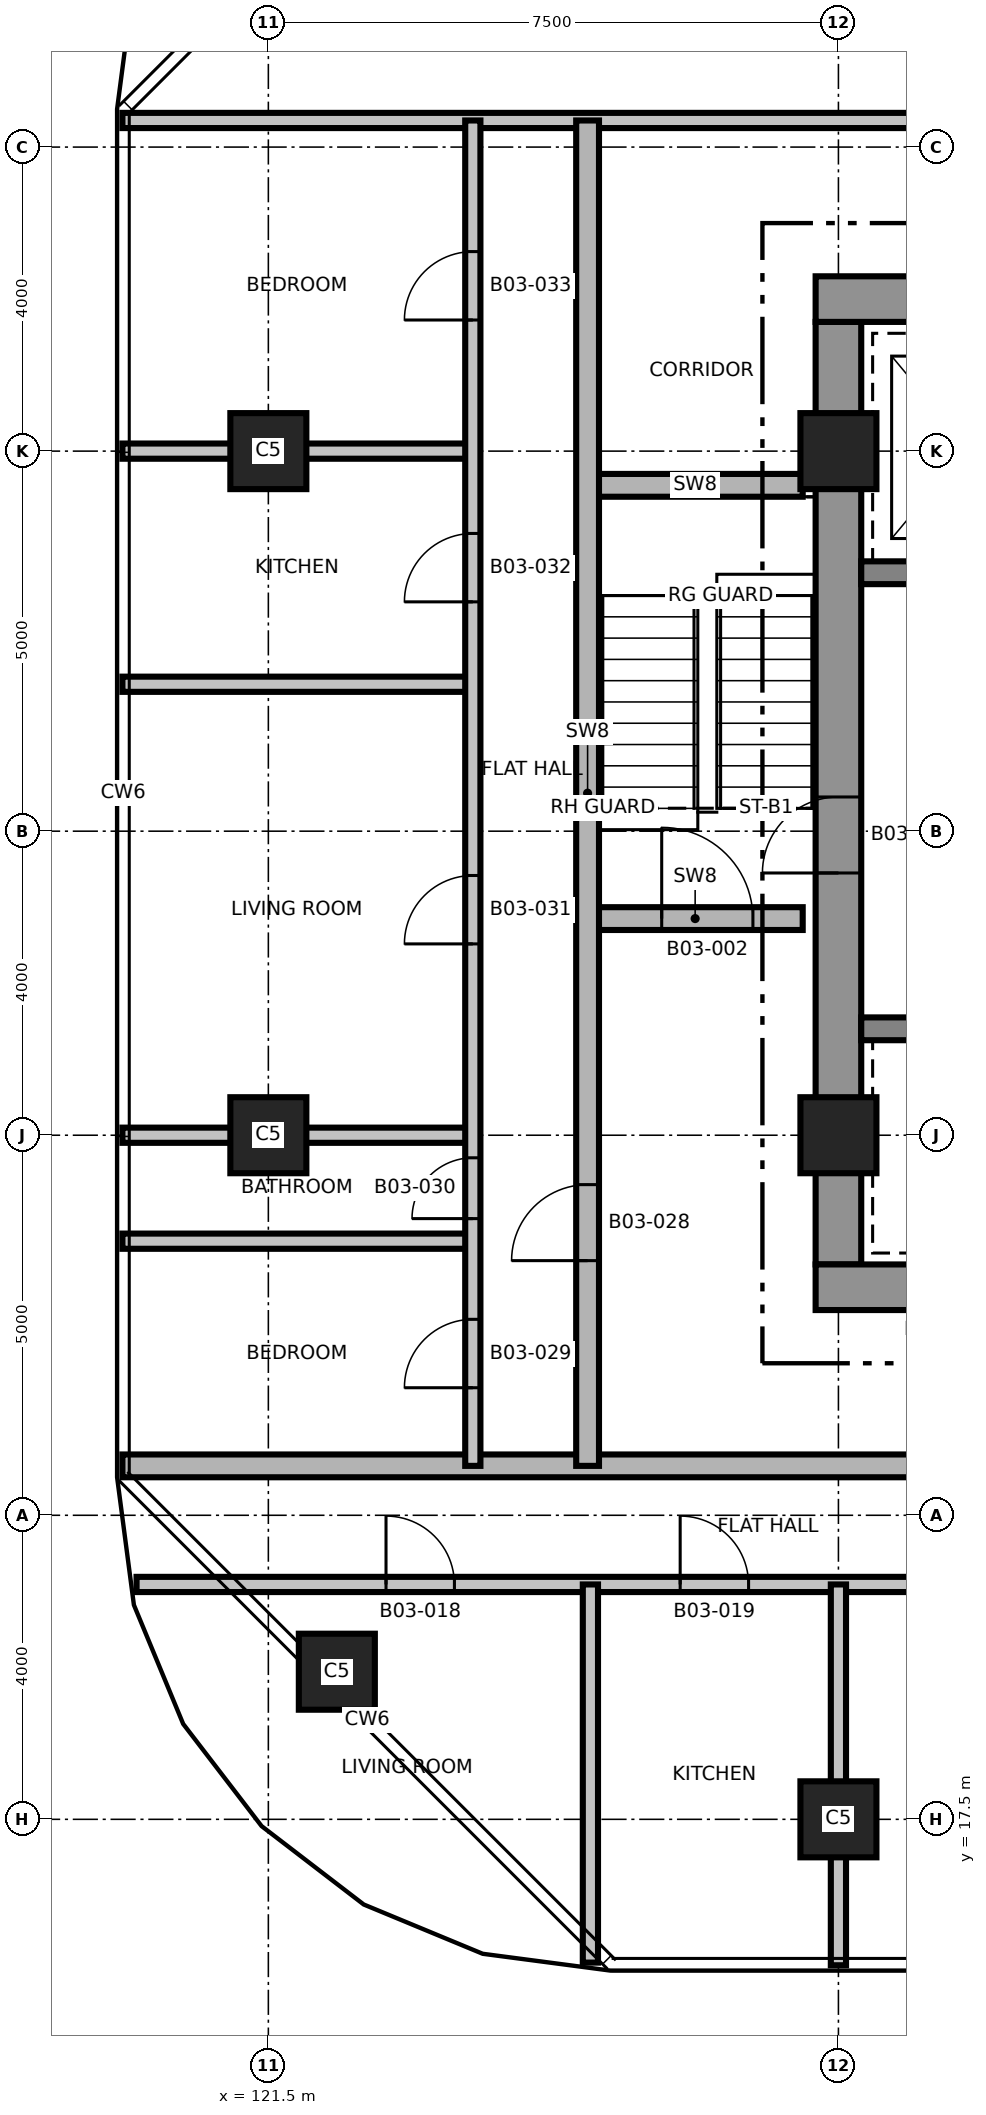
"""IFC4 building model, lengths in metres.
Left out: names, types, materials, properties, quantities, classifications, styles, units other than length and angle.
Written with IfcOpenShell. Run it as: python <this file> out.ifc"""

import sys

from ifc_helpers import new_model, si_unit, direction, frame, frame_2d, origin, origin_2d, place, context, subcontext, project, spatial, rectangle, extrude, element, fill, save


model = new_model("IFC4")
c1 = context("Model", 3, precision=1e-05, world=origin(), true_north=direction((0.0, 1.0)))
c2 = subcontext(c1, "Body", "Model", "MODEL_VIEW")
j1 = project(units=[si_unit("LENGTHUNIT", "METRE"), si_unit("PLANEANGLEUNIT", "RADIAN")], contexts=[c1])
p1 = place(None, origin())
s1 = spatial("IfcSite", under=j1, at=p1, CompositionType="ELEMENT")
p2 = place(p1, origin())
s2 = spatial("IfcBuilding", under=s1, at=p2, CompositionType="ELEMENT")
p3 = place(p2, frame((0.0, 0.0, 55.7)))
s3 = spatial("IfcBuildingStorey", under=s2, at=p3, CompositionType="ELEMENT", Elevation=55.7)
p4 = place(p3, frame((129.0, 24.8, 0.0), z_axis=(0.0, 0.0, 1.0), x_axis=(0.0, 1.0, 0.0)))
e1 = element("IfcWall", 1, at=p4, inside=s3, PredefinedType="SHEAR", context=c2, shape_type="SweptSolid", body=[
    extrude(rectangle(XDim=12.4, YDim=0.6, at=frame_2d((6.2, 0.0))), origin(), (0.0, 0.0, 1.0), 3.7),
])
p5 = place(p4, frame((5.15, 0.0, 0.0)))
e2 = element("IfcOpeningElement", 2, at=p5, cuts=e1, PredefinedType="OPENING", context=c2, shape_type="SweptSolid", body=[
    extrude(rectangle(XDim=1.0, YDim=2.1, at=frame_2d((0.5, 1.05))), frame((0.0, 0.31, 0.0), z_axis=(0.0, -1.0, 0.0), x_axis=(1.0, 0.0, 0.0)), (0.0, 0.0, 1.0), 0.62),
])
p6 = place(p3, frame((128.7, 24.5, 0.0), z_axis=(0.0, 0.0, 1.0), x_axis=(1.0, 0.0, 0.0)))
e3 = element("IfcWall", 3, at=p6, inside=s3, PredefinedType="SHEAR", context=c2, shape_type="SweptSolid", body=[
    extrude(rectangle(XDim=15.0, YDim=0.6, at=frame_2d((7.5, 0.0))), origin(), (0.0, 0.0, 1.0), 3.7),
])
p7 = place(p6, frame((9.65, 0.0, 0.0)))
e4 = element("IfcOpeningElement", 4, at=p7, cuts=e3, PredefinedType="OPENING", context=c2, shape_type="SweptSolid", body=[
    extrude(rectangle(XDim=1.5, YDim=2.1, at=frame_2d((0.75, 1.05))), frame((0.0, 0.31, 0.0), z_axis=(0.0, -1.0, 0.0), x_axis=(1.0, 0.0, 0.0)), (0.0, 0.0, 1.0), 0.62),
])
p8 = place(p6, frame((1.25, 0.0, 0.0)))
e5 = element("IfcOpeningElement", 5, at=p8, cuts=e3, PredefinedType="OPENING", context=c2, shape_type="SweptSolid", body=[
    extrude(rectangle(XDim=0.9, YDim=2.1, at=frame_2d((0.45, 1.05))), frame((0.0, 0.31, 0.0), z_axis=(0.0, -1.0, 0.0), x_axis=(1.0, 0.0, 0.0)), (0.0, 0.0, 1.0), 0.62),
])
p9 = place(p3, frame((128.7, 37.5, 0.0), z_axis=(0.0, 0.0, 1.0), x_axis=(1.0, 0.0, 0.0)))
e6 = element("IfcWall", 6, at=p9, inside=s3, PredefinedType="SHEAR", context=c2, shape_type="SweptSolid", body=[
    extrude(rectangle(XDim=15.0, YDim=0.6, at=frame_2d((7.5, 0.0))), origin(), (0.0, 0.0, 1.0), 3.7),
])
p10 = place(p9, frame((9.65, 0.0, 0.0)))
e7 = element("IfcOpeningElement", 7, at=p10, cuts=e6, PredefinedType="OPENING", context=c2, shape_type="SweptSolid", body=[
    extrude(rectangle(XDim=1.5, YDim=2.1, at=frame_2d((0.75, 1.05))), frame((0.0, 0.31, 0.0), z_axis=(0.0, -1.0, 0.0), x_axis=(1.0, 0.0, 0.0)), (0.0, 0.0, 1.0), 0.62),
])
p11 = place(p9, frame((12.85, 0.0, 0.0)))
e8 = element("IfcOpeningElement", 8, at=p11, cuts=e6, PredefinedType="OPENING", context=c2, shape_type="SweptSolid", body=[
    extrude(rectangle(XDim=0.9, YDim=2.1, at=frame_2d((0.45, 1.05))), frame((0.0, 0.31, 0.0), z_axis=(0.0, -1.0, 0.0), x_axis=(1.0, 0.0, 0.0)), (0.0, 0.0, 1.0), 0.62),
])
p12 = place(p9, frame((3.8, 0.0, 0.0)))
e9 = element("IfcOpeningElement", 9, at=p12, cuts=e6, PredefinedType="OPENING", context=c2, shape_type="SweptSolid", body=[
    extrude(rectangle(XDim=0.9, YDim=2.1, at=frame_2d((0.45, 1.05))), frame((0.0, 0.31, 0.0), z_axis=(0.0, -1.0, 0.0), x_axis=(1.0, 0.0, 0.0)), (0.0, 0.0, 1.0), 0.62),
])
p13 = place(p9, frame((6.7, 0.0, 0.0)))
e10 = element("IfcOpeningElement", 10, at=p13, cuts=e6, PredefinedType="OPENING", context=c2, shape_type="SweptSolid", body=[
    extrude(rectangle(XDim=0.9, YDim=2.1, at=frame_2d((0.45, 1.05))), frame((0.0, 0.31, 0.0), z_axis=(0.0, -1.0, 0.0), x_axis=(1.0, 0.0, 0.0)), (0.0, 0.0, 1.0), 0.62),
])
p14 = place(p3, frame((129.3, 27.9, 0.0), z_axis=(0.0, 0.0, 1.0), x_axis=(1.0, 0.0, 0.0)))
e11 = element("IfcWall", 11, at=p14, inside=s3, PredefinedType="SHEAR", context=c2, shape_type="SweptSolid", body=[
    extrude(rectangle(XDim=2.65, YDim=0.3, at=frame_2d((1.325, 0.0))), origin(), (0.0, 0.0, 1.0), 3.7),
])
p15 = place(p3, frame((129.3, 33.9, 0.0), z_axis=(0.0, 0.0, 1.0), x_axis=(1.0, 0.0, 0.0)))
e12 = element("IfcWall", 12, at=p15, inside=s3, PredefinedType="SHEAR", context=c2, shape_type="SweptSolid", body=[
    extrude(rectangle(XDim=2.65, YDim=0.3, at=frame_2d((1.325, 0.0))), origin(), (0.0, 0.0, 1.0), 3.7),
])
p16 = place(p15, frame((1.05, 0.0, 0.0)))
e13 = element("IfcOpeningElement", 13, at=p16, cuts=e12, PredefinedType="OPENING", context=c2, shape_type="SweptSolid", body=[
    extrude(rectangle(XDim=1.3, YDim=2.4, at=frame_2d((0.65, 1.2))), frame((0.0, 0.16, 0.0), z_axis=(0.0, -1.0, 0.0), x_axis=(1.0, 0.0, 0.0)), (0.0, 0.0, 1.0), 0.32),
])
for number, where, z_axis, x_axis in (
    (14, (129.0, 17.5, 0.0), (0.0, 0.0, 1.0), (1.0, 0.0, 0.0)),
    (15, (122.401, 19.442, 0.0), (0.0, 0.0, 1.0), (1.0, 0.0, 0.0)),
    (16, (121.5, 26.5, 0.0), (0.0, 0.0, 1.0), (1.0, 0.0, 0.0)),
    (17, (129.0, 26.5, 0.0), (0.0, 0.0, 1.0), (1.0, 0.0, 0.0)),
    (18, (121.5, 35.5, 0.0), (0.0, 0.0, 1.0), (1.0, 0.0, 0.0)),
    (19, (129.0, 35.5, 0.0), (0.0, 0.0, 1.0), (1.0, 0.0, 0.0)),
):
    element("IfcColumn", number, at=place(p3, frame(where, z_axis=z_axis, x_axis=x_axis)), inside=s3, PredefinedType="COLUMN", context=c2, shape_type="SweptSolid", body=[
        extrude(rectangle(XDim=1.0, YDim=1.0, at=origin_2d()), origin(), (0.0, 0.0, 1.0), 3.7),
    ])
p17 = place(p3, frame((119.766, 20.59, 0.0), z_axis=(0.0, 0.0, 1.0), x_axis=(1.0, 0.0, 0.0)))
e20 = element("IfcWall", 20, at=p17, inside=s3, PredefinedType="PARTITIONING", context=c2, shape_type="SweptSolid", body=[
    extrude(rectangle(XDim=16.734, YDim=0.2, at=frame_2d((8.367, 0.0))), origin(), (0.0, 0.0, 1.0), 3.4),
])
p18 = place(p17, frame((3.282, 0.0, 0.0)))
e21 = element("IfcOpeningElement", 21, at=p18, cuts=e20, PredefinedType="OPENING", context=c2, shape_type="SweptSolid", body=[
    extrude(rectangle(XDim=0.9, YDim=2.1, at=frame_2d((0.45, 1.05))), frame((0.0, 0.11, 0.0), z_axis=(0.0, -1.0, 0.0), x_axis=(1.0, 0.0, 0.0)), (0.0, 0.0, 1.0), 0.22),
])
p19 = place(p17, frame((7.152, 0.0, 0.0)))
e22 = element("IfcOpeningElement", 22, at=p19, cuts=e20, PredefinedType="OPENING", context=c2, shape_type="SweptSolid", body=[
    extrude(rectangle(XDim=0.9, YDim=2.1, at=frame_2d((0.45, 1.05))), frame((0.0, 0.11, 0.0), z_axis=(0.0, -1.0, 0.0), x_axis=(1.0, 0.0, 0.0)), (0.0, 0.0, 1.0), 0.22),
])
p20 = place(p17, frame((11.318, 0.0, 0.0)))
e23 = element("IfcOpeningElement", 23, at=p20, cuts=e20, PredefinedType="OPENING", context=c2, shape_type="SweptSolid", body=[
    extrude(rectangle(XDim=0.9, YDim=2.1, at=frame_2d((0.45, 1.05))), frame((0.0, 0.11, 0.0), z_axis=(0.0, -1.0, 0.0), x_axis=(1.0, 0.0, 0.0)), (0.0, 0.0, 1.0), 0.22),
])
p21 = place(p17, frame((15.118, 0.0, 0.0)))
e24 = element("IfcOpeningElement", 24, at=p21, cuts=e20, PredefinedType="OPENING", context=c2, shape_type="SweptSolid", body=[
    extrude(rectangle(XDim=0.8, YDim=2.1, at=frame_2d((0.4, 1.05))), frame((0.0, 0.11, 0.0), z_axis=(0.0, -1.0, 0.0), x_axis=(1.0, 0.0, 0.0)), (0.0, 0.0, 1.0), 0.22),
])
p22 = place(p3, frame((119.58, 22.15, 0.0), z_axis=(0.0, 0.0, 1.0), x_axis=(1.0, 0.0, 0.0)))
e25 = element("IfcWall", 25, at=p22, inside=s3, PredefinedType="SHEAR", context=c2, shape_type="SweptSolid", body=[
    extrude(rectangle(XDim=33.84, YDim=0.3, at=frame_2d((16.92, 0.0))), origin(), (0.0, 0.0, 1.0), 3.4),
])
p23 = place(p22, frame((23.17, 0.0, 0.0)))
e26 = element("IfcOpeningElement", 26, at=p23, cuts=e25, PredefinedType="OPENING", context=c2, shape_type="SweptSolid", body=[
    extrude(rectangle(XDim=1.0, YDim=2.1, at=frame_2d((0.5, 1.05))), frame((0.0, 0.16, 0.0), z_axis=(0.0, -1.0, 0.0), x_axis=(1.0, 0.0, 0.0)), (0.0, 0.0, 1.0), 0.32),
])
p24 = place(p22, frame((11.52, 0.0, 0.0)))
e27 = element("IfcOpeningElement", 27, at=p24, cuts=e25, PredefinedType="OPENING", context=c2, shape_type="SweptSolid", body=[
    extrude(rectangle(XDim=1.0, YDim=2.1, at=frame_2d((0.5, 1.05))), frame((0.0, 0.16, 0.0), z_axis=(0.0, -1.0, 0.0), x_axis=(1.0, 0.0, 0.0)), (0.0, 0.0, 1.0), 0.32),
])
p25 = place(p22, frame((25.07, 0.0, 0.0)))
e28 = element("IfcOpeningElement", 28, at=p25, cuts=e25, PredefinedType="OPENING", context=c2, shape_type="SweptSolid", body=[
    extrude(rectangle(XDim=1.0, YDim=2.1, at=frame_2d((0.5, 1.05))), frame((0.0, 0.16, 0.0), z_axis=(0.0, -1.0, 0.0), x_axis=(1.0, 0.0, 0.0)), (0.0, 0.0, 1.0), 0.32),
])
p26 = place(p22, frame((17.17, 0.0, 0.0)))
e29 = element("IfcOpeningElement", 29, at=p26, cuts=e25, PredefinedType="OPENING", context=c2, shape_type="SweptSolid", body=[
    extrude(rectangle(XDim=0.9, YDim=2.1, at=frame_2d((0.45, 1.05))), frame((0.0, 0.16, 0.0), z_axis=(0.0, -1.0, 0.0), x_axis=(1.0, 0.0, 0.0)), (0.0, 0.0, 1.0), 0.32),
])
for number, where, z_axis, x_axis in (
    (30, (119.58, 25.106, 0.0), (0.0, 0.0, 1.0), (1.0, 0.0, 0.0)),
    (31, (119.58, 26.5, 0.0), (0.0, 0.0, 1.0), (1.0, 0.0, 0.0)),
):
    element("IfcWall", number, at=place(p3, frame(where, z_axis=z_axis, x_axis=x_axis)), inside=s3, PredefinedType="PARTITIONING", context=c2, shape_type="SweptSolid", body=[
        extrude(rectangle(XDim=4.61, YDim=0.2, at=frame_2d((2.305, 0.0))), origin(), (0.0, 0.0, 1.0), 3.4),
    ])
p27 = place(p3, frame((125.7, 29.35, 0.0), z_axis=(0.0, 0.0, 1.0), x_axis=(1.0, 0.0, 0.0)))
e32 = element("IfcWall", 32, at=p27, inside=s3, PredefinedType="SHEAR", context=c2, shape_type="SweptSolid", body=[
    extrude(rectangle(XDim=2.83, YDim=0.3, at=frame_2d((1.415, 0.0))), origin(), (0.0, 0.0, 1.0), 3.4),
])
p28 = place(p27, frame((0.975, 0.0, 0.0)))
e33 = element("IfcOpeningElement", 33, at=p28, cuts=e32, PredefinedType="OPENING", context=c2, shape_type="SweptSolid", body=[
    extrude(rectangle(XDim=1.2, YDim=2.1, at=frame_2d((0.6, 1.05))), frame((0.0, 0.16, 0.0), z_axis=(0.0, -1.0, 0.0), x_axis=(1.0, 0.0, 0.0)), (0.0, 0.0, 1.0), 0.32),
])
p29 = place(p3, frame((119.58, 32.433, 0.0), z_axis=(0.0, 0.0, 1.0), x_axis=(1.0, 0.0, 0.0)))
e34 = element("IfcWall", 34, at=p29, inside=s3, PredefinedType="PARTITIONING", context=c2, shape_type="SweptSolid", body=[
    extrude(rectangle(XDim=4.61, YDim=0.2, at=frame_2d((2.305, 0.0))), origin(), (0.0, 0.0, 1.0), 3.4),
])
p30 = place(p3, frame((125.7, 35.05, 0.0), z_axis=(0.0, 0.0, 1.0), x_axis=(1.0, 0.0, 0.0)))
e35 = element("IfcWall", 35, at=p30, inside=s3, PredefinedType="SHEAR", context=c2, shape_type="SweptSolid", body=[
    extrude(rectangle(XDim=2.83, YDim=0.3, at=frame_2d((1.415, 0.0))), origin(), (0.0, 0.0, 1.0), 3.4),
])
p31 = place(p3, frame((119.58, 35.5, 0.0), z_axis=(0.0, 0.0, 1.0), x_axis=(1.0, 0.0, 0.0)))
e36 = element("IfcWall", 36, at=p31, inside=s3, PredefinedType="PARTITIONING", context=c2, shape_type="SweptSolid", body=[
    extrude(rectangle(XDim=4.61, YDim=0.2, at=frame_2d((2.305, 0.0))), origin(), (0.0, 0.0, 1.0), 3.4),
])
p32 = place(p3, frame((119.58, 39.85, 0.0), z_axis=(0.0, 0.0, 1.0), x_axis=(1.0, 0.0, 0.0)))
e37 = element("IfcWall", 37, at=p32, inside=s3, PredefinedType="PARTITIONING", context=c2, shape_type="SweptSolid", body=[
    extrude(rectangle(XDim=33.84, YDim=0.2, at=frame_2d((16.92, 0.0))), origin(), (0.0, 0.0, 1.0), 3.4),
])
p33 = place(p32, frame((15.27, 0.0, 0.0)))
e38 = element("IfcOpeningElement", 38, at=p33, cuts=e37, PredefinedType="OPENING", context=c2, shape_type="SweptSolid", body=[
    extrude(rectangle(XDim=1.0, YDim=2.1, at=frame_2d((0.5, 1.05))), frame((0.0, 0.11, 0.0), z_axis=(0.0, -1.0, 0.0), x_axis=(1.0, 0.0, 0.0)), (0.0, 0.0, 1.0), 0.22),
])
p34 = place(p32, frame((25.07, 0.0, 0.0)))
e39 = element("IfcOpeningElement", 39, at=p34, cuts=e37, PredefinedType="OPENING", context=c2, shape_type="SweptSolid", body=[
    extrude(rectangle(XDim=1.0, YDim=2.1, at=frame_2d((0.5, 1.05))), frame((0.0, 0.11, 0.0), z_axis=(0.0, -1.0, 0.0), x_axis=(1.0, 0.0, 0.0)), (0.0, 0.0, 1.0), 0.22),
])
p35 = place(p3, frame((124.19, 22.15, 0.0), z_axis=(0.0, 0.0, 1.0), x_axis=(0.0, 1.0, 0.0)))
e40 = element("IfcWall", 40, at=p35, inside=s3, PredefinedType="PARTITIONING", context=c2, shape_type="SweptSolid", body=[
    extrude(rectangle(XDim=17.7, YDim=0.2, at=frame_2d((8.85, 0.0))), origin(), (0.0, 0.0, 1.0), 3.4),
])
p36 = place(p35, frame((1.028, 0.0, 0.0)))
e41 = element("IfcOpeningElement", 41, at=p36, cuts=e40, PredefinedType="OPENING", context=c2, shape_type="SweptSolid", body=[
    extrude(rectangle(XDim=0.9, YDim=2.1, at=frame_2d((0.45, 1.05))), frame((0.0, 0.11, 0.0), z_axis=(0.0, -1.0, 0.0), x_axis=(1.0, 0.0, 0.0)), (0.0, 0.0, 1.0), 0.22),
])
p37 = place(p35, frame((3.253, 0.0, 0.0)))
e42 = element("IfcOpeningElement", 42, at=p37, cuts=e40, PredefinedType="OPENING", context=c2, shape_type="SweptSolid", body=[
    extrude(rectangle(XDim=0.8, YDim=2.1, at=frame_2d((0.4, 1.05))), frame((0.0, 0.11, 0.0), z_axis=(0.0, -1.0, 0.0), x_axis=(1.0, 0.0, 0.0)), (0.0, 0.0, 1.0), 0.22),
])
p38 = place(p35, frame((6.867, 0.0, 0.0)))
e43 = element("IfcOpeningElement", 43, at=p38, cuts=e40, PredefinedType="OPENING", context=c2, shape_type="SweptSolid", body=[
    extrude(rectangle(XDim=0.9, YDim=2.1, at=frame_2d((0.45, 1.05))), frame((0.0, 0.11, 0.0), z_axis=(0.0, -1.0, 0.0), x_axis=(1.0, 0.0, 0.0)), (0.0, 0.0, 1.0), 0.22),
])
p39 = place(p35, frame((11.367, 0.0, 0.0)))
e44 = element("IfcOpeningElement", 44, at=p39, cuts=e40, PredefinedType="OPENING", context=c2, shape_type="SweptSolid", body=[
    extrude(rectangle(XDim=0.9, YDim=2.1, at=frame_2d((0.45, 1.05))), frame((0.0, 0.11, 0.0), z_axis=(0.0, -1.0, 0.0), x_axis=(1.0, 0.0, 0.0)), (0.0, 0.0, 1.0), 0.22),
])
p40 = place(p35, frame((15.075, 0.0, 0.0)))
e45 = element("IfcOpeningElement", 45, at=p40, cuts=e40, PredefinedType="OPENING", context=c2, shape_type="SweptSolid", body=[
    extrude(rectangle(XDim=0.9, YDim=2.1, at=frame_2d((0.45, 1.05))), frame((0.0, 0.11, 0.0), z_axis=(0.0, -1.0, 0.0), x_axis=(1.0, 0.0, 0.0)), (0.0, 0.0, 1.0), 0.22),
])
p41 = place(p3, frame((125.7, 22.15, 0.0), z_axis=(0.0, 0.0, 1.0), x_axis=(0.0, 1.0, 0.0)))
e46 = element("IfcWall", 46, at=p41, inside=s3, PredefinedType="SHEAR", context=c2, shape_type="SweptSolid", body=[
    extrude(rectangle(XDim=17.7, YDim=0.3, at=frame_2d((8.85, 0.0))), origin(), (0.0, 0.0, 1.0), 3.4),
])
p42 = place(p41, frame((2.7, 0.0, 0.0)))
e47 = element("IfcOpeningElement", 47, at=p42, cuts=e46, PredefinedType="OPENING", context=c2, shape_type="SweptSolid", body=[
    extrude(rectangle(XDim=1.0, YDim=2.1, at=frame_2d((0.5, 1.05))), frame((0.0, 0.16, 0.0), z_axis=(0.0, -1.0, 0.0), x_axis=(1.0, 0.0, 0.0)), (0.0, 0.0, 1.0), 0.32),
])
p43 = place(p3, frame((125.737, 15.615, 0.0), z_axis=(0.0, 0.0, 1.0), x_axis=(0.0, 1.0, 0.0)))
e48 = element("IfcWall", 48, at=p43, inside=s3, PredefinedType="PARTITIONING", context=c2, shape_type="SweptSolid", body=[
    extrude(rectangle(XDim=4.975, YDim=0.2, at=frame_2d((2.488, 0.0))), origin(), (0.0, 0.0, 1.0), 3.4),
])
p44 = place(p3, frame((129.0, 15.58, 0.0), z_axis=(0.0, 0.0, 1.0), x_axis=(0.0, 1.0, 0.0)))
e49 = element("IfcWall", 49, at=p44, inside=s3, PredefinedType="PARTITIONING", context=c2, shape_type="SweptSolid", body=[
    extrude(rectangle(XDim=5.01, YDim=0.2, at=frame_2d((2.505, 0.0))), origin(), (0.0, 0.0, 1.0), 3.4),
])
p45 = place(p28, origin())
e50 = element("IfcDoor", 50, at=p45, inside=s3, OperationType="SINGLE_SWING_RIGHT", PredefinedType="DOOR", context=c2, shape_type="SweptSolid", body=[
    extrude(rectangle(XDim=1.2, YDim=2.1, at=frame_2d((0.6, 1.05))), frame((0.0, 0.025, 0.0), z_axis=(0.0, -1.0, 0.0), x_axis=(1.0, 0.0, 0.0)), (0.0, 0.0, 1.0), 0.05),
])
fill(e33, e50)
p46 = place(p18, origin())
e51 = element("IfcDoor", 51, at=p46, inside=s3, OperationType="SINGLE_SWING_RIGHT", PredefinedType="DOOR", context=c2, shape_type="SweptSolid", body=[
    extrude(rectangle(XDim=0.9, YDim=2.1, at=frame_2d((0.45, 1.05))), frame((0.0, 0.025, 0.0), z_axis=(0.0, -1.0, 0.0), x_axis=(1.0, 0.0, 0.0)), (0.0, 0.0, 1.0), 0.05),
])
fill(e21, e51)
p47 = place(p19, origin())
e52 = element("IfcDoor", 52, at=p47, inside=s3, OperationType="SINGLE_SWING_LEFT", PredefinedType="DOOR", context=c2, shape_type="SweptSolid", body=[
    extrude(rectangle(XDim=0.9, YDim=2.1, at=frame_2d((0.45, 1.05))), frame((0.0, 0.025, 0.0), z_axis=(0.0, -1.0, 0.0), x_axis=(1.0, 0.0, 0.0)), (0.0, 0.0, 1.0), 0.05),
])
fill(e22, e52)
p48 = place(p42, origin())
e53 = element("IfcDoor", 53, at=p48, inside=s3, OperationType="SINGLE_SWING_RIGHT", PredefinedType="DOOR", context=c2, shape_type="SweptSolid", body=[
    extrude(rectangle(XDim=1.0, YDim=2.1, at=frame_2d((0.5, 1.05))), frame((0.0, 0.025, 0.0), z_axis=(0.0, -1.0, 0.0), x_axis=(1.0, 0.0, 0.0)), (0.0, 0.0, 1.0), 0.05),
])
fill(e47, e53)
p49 = place(p36, origin())
e54 = element("IfcDoor", 54, at=p49, inside=s3, OperationType="SINGLE_SWING_LEFT", PredefinedType="DOOR", context=c2, shape_type="SweptSolid", body=[
    extrude(rectangle(XDim=0.9, YDim=2.1, at=frame_2d((0.45, 1.05))), frame((0.0, 0.025, 0.0), z_axis=(0.0, -1.0, 0.0), x_axis=(1.0, 0.0, 0.0)), (0.0, 0.0, 1.0), 0.05),
])
fill(e41, e54)
p50 = place(p37, origin())
e55 = element("IfcDoor", 55, at=p50, inside=s3, OperationType="SINGLE_SWING_RIGHT", PredefinedType="DOOR", context=c2, shape_type="SweptSolid", body=[
    extrude(rectangle(XDim=0.8, YDim=2.1, at=frame_2d((0.4, 1.05))), frame((0.0, 0.025, 0.0), z_axis=(0.0, -1.0, 0.0), x_axis=(1.0, 0.0, 0.0)), (0.0, 0.0, 1.0), 0.05),
])
fill(e42, e55)
p51 = place(p38, origin())
e56 = element("IfcDoor", 56, at=p51, inside=s3, OperationType="SINGLE_SWING_LEFT", PredefinedType="DOOR", context=c2, shape_type="SweptSolid", body=[
    extrude(rectangle(XDim=0.9, YDim=2.1, at=frame_2d((0.45, 1.05))), frame((0.0, 0.025, 0.0), z_axis=(0.0, -1.0, 0.0), x_axis=(1.0, 0.0, 0.0)), (0.0, 0.0, 1.0), 0.05),
])
fill(e43, e56)
p52 = place(p39, origin())
e57 = element("IfcDoor", 57, at=p52, inside=s3, OperationType="SINGLE_SWING_RIGHT", PredefinedType="DOOR", context=c2, shape_type="SweptSolid", body=[
    extrude(rectangle(XDim=0.9, YDim=2.1, at=frame_2d((0.45, 1.05))), frame((0.0, 0.025, 0.0), z_axis=(0.0, -1.0, 0.0), x_axis=(1.0, 0.0, 0.0)), (0.0, 0.0, 1.0), 0.05),
])
fill(e44, e57)
p53 = place(p40, origin())
e58 = element("IfcDoor", 58, at=p53, inside=s3, OperationType="SINGLE_SWING_LEFT", PredefinedType="DOOR", context=c2, shape_type="SweptSolid", body=[
    extrude(rectangle(XDim=0.9, YDim=2.1, at=frame_2d((0.45, 1.05))), frame((0.0, 0.025, 0.0), z_axis=(0.0, -1.0, 0.0), x_axis=(1.0, 0.0, 0.0)), (0.0, 0.0, 1.0), 0.05),
])
fill(e45, e58)
p54 = place(p5, origin())
e59 = element("IfcDoor", 59, at=p54, inside=s3, OperationType="SINGLE_SWING_RIGHT", PredefinedType="DOOR", context=c2, shape_type="SweptSolid", body=[
    extrude(rectangle(XDim=1.0, YDim=2.1, at=frame_2d((0.5, 1.05))), frame((0.0, 0.025, 0.0), z_axis=(0.0, -1.0, 0.0), x_axis=(1.0, 0.0, 0.0)), (0.0, 0.0, 1.0), 0.05),
])
fill(e2, e59)
save(model, sys.argv[1])
